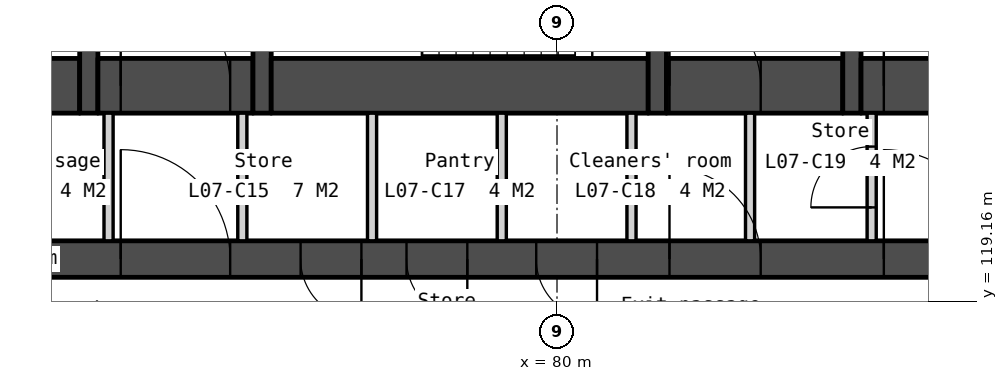
"""IFC4 building model, lengths in metres.
Left out: names, types, materials, properties, quantities, classifications, styles, units other than length and angle.
Written with IfcOpenShell. Run it as: python <this file> out.ifc"""

import sys

from ifc_helpers import new_model, si_unit, direction, frame, frame_2d, origin, place, context, subcontext, project, spatial, polyline, rectangle, outline, extrude, element, fill, save


model = new_model("IFC4")
c1 = context("Model", 3, precision=1e-05, world=origin(), true_north=direction((0.0, 1.0)))
c2 = subcontext(c1, "Body", "Model", "MODEL_VIEW")
j1 = project(units=[si_unit("LENGTHUNIT", "METRE"), si_unit("PLANEANGLEUNIT", "RADIAN")], contexts=[c1])
p1 = place(None, origin())
s1 = spatial("IfcSite", under=j1, at=p1, CompositionType="ELEMENT")
p2 = place(p1, origin())
s2 = spatial("IfcBuilding", under=s1, at=p2, CompositionType="ELEMENT")
p3 = place(p2, frame((0.0, 0.0, 38.5)))
s3 = spatial("IfcBuildingStorey", under=s2, at=p3, CompositionType="ELEMENT", Elevation=38.5)
p4 = place(p3, frame((66.0, 119.85, 0.0), z_axis=(0.0, 0.0, 1.0), x_axis=(1.0, 0.0, 0.0)))
e1 = element("IfcWall", 1, at=p4, inside=s3, PredefinedType="SOLIDWALL", context=c2, shape_type="SweptSolid", body=[
    extrude(rectangle(XDim=28.0, YDim=0.6, at=frame_2d((14.0, 0.0))), origin(), (0.0, 0.0, 1.0), 3.35),
])
p5 = place(p4, frame((6.825, 0.0, 0.0)))
e2 = element("IfcOpeningElement", 2, at=p5, cuts=e1, PredefinedType="OPENING", context=c2, shape_type="SweptSolid", body=[
    extrude(rectangle(XDim=1.8, YDim=2.1, at=frame_2d((0.9, 1.05))), frame((0.0, 0.31, 0.0), z_axis=(0.0, -1.0, 0.0), x_axis=(1.0, 0.0, 0.0)), (0.0, 0.0, 1.0), 0.62),
])
p6 = place(p4, frame((15.85, 0.0, 0.0)))
e3 = element("IfcOpeningElement", 3, at=p6, cuts=e1, PredefinedType="OPENING", context=c2, shape_type="SweptSolid", body=[
    extrude(rectangle(XDim=1.5, YDim=2.1, at=frame_2d((0.75, 1.05))), frame((0.0, 0.31, 0.0), z_axis=(0.0, -1.0, 0.0), x_axis=(1.0, 0.0, 0.0)), (0.0, 0.0, 1.0), 0.62),
])
p7 = place(p4, frame((19.375, 0.0, 0.0)))
e4 = element("IfcOpeningElement", 4, at=p7, cuts=e1, PredefinedType="OPENING", context=c2, shape_type="SweptSolid", body=[
    extrude(rectangle(XDim=1.8, YDim=2.1, at=frame_2d((0.9, 1.05))), frame((0.0, 0.31, 0.0), z_axis=(0.0, -1.0, 0.0), x_axis=(1.0, 0.0, 0.0)), (0.0, 0.0, 1.0), 0.62),
])
p8 = place(p4, frame((4.425, 0.0, 0.0)))
e5 = element("IfcOpeningElement", 5, at=p8, cuts=e1, PredefinedType="OPENING", context=c2, shape_type="SweptSolid", body=[
    extrude(rectangle(XDim=1.0, YDim=2.1, at=frame_2d((0.5, 1.05))), frame((0.0, 0.31, 0.0), z_axis=(0.0, -1.0, 0.0), x_axis=(1.0, 0.0, 0.0)), (0.0, 0.0, 1.0), 0.62),
])
p9 = place(p4, frame((9.783, 0.0, 0.0)))
e6 = element("IfcOpeningElement", 6, at=p9, cuts=e1, PredefinedType="OPENING", context=c2, shape_type="SweptSolid", body=[
    extrude(rectangle(XDim=1.0, YDim=2.1, at=frame_2d((0.5, 1.05))), frame((0.0, 0.31, 0.0), z_axis=(0.0, -1.0, 0.0), x_axis=(1.0, 0.0, 0.0)), (0.0, 0.0, 1.0), 0.62),
])
p10 = place(p4, frame((11.525, 0.0, 0.0)))
e7 = element("IfcOpeningElement", 7, at=p10, cuts=e1, PredefinedType="OPENING", context=c2, shape_type="SweptSolid", body=[
    extrude(rectangle(XDim=1.0, YDim=2.1, at=frame_2d((0.5, 1.05))), frame((0.0, 0.31, 0.0), z_axis=(0.0, -1.0, 0.0), x_axis=(1.0, 0.0, 0.0)), (0.0, 0.0, 1.0), 0.62),
])
p11 = place(p4, frame((13.658, 0.0, 0.0)))
e8 = element("IfcOpeningElement", 8, at=p11, cuts=e1, PredefinedType="OPENING", context=c2, shape_type="SweptSolid", body=[
    extrude(rectangle(XDim=1.0, YDim=2.1, at=frame_2d((0.5, 1.05))), frame((0.0, 0.31, 0.0), z_axis=(0.0, -1.0, 0.0), x_axis=(1.0, 0.0, 0.0)), (0.0, 0.0, 1.0), 0.62),
])
p12 = place(p4, frame((22.575, 0.0, 0.0)))
e9 = element("IfcOpeningElement", 9, at=p12, cuts=e1, PredefinedType="OPENING", context=c2, shape_type="SweptSolid", body=[
    extrude(rectangle(XDim=1.0, YDim=2.1, at=frame_2d((0.5, 1.05))), frame((0.0, 0.31, 0.0), z_axis=(0.0, -1.0, 0.0), x_axis=(1.0, 0.0, 0.0)), (0.0, 0.0, 1.0), 0.62),
])
p13 = place(p3, frame((69.6, 122.7, 0.0), z_axis=(0.0, 0.0, 1.0), x_axis=(1.0, 0.0, 0.0)))
e10 = element("IfcWall", 10, at=p13, inside=s3, PredefinedType="SOLIDWALL", context=c2, shape_type="SweptSolid", body=[
    extrude(rectangle(XDim=2.55, YDim=0.9, at=frame_2d((1.275, 0.0))), origin(), (0.0, 0.0, 1.0), 3.35),
])
p14 = place(p3, frame((72.3, 133.95, 0.0), z_axis=(0.0, 0.0, 1.0), x_axis=(0.0, -1.0, 0.0)))
e11 = element("IfcWall", 11, at=p14, inside=s3, PredefinedType="SOLIDWALL", context=c2, shape_type="SweptSolid", body=[
    extrude(rectangle(XDim=11.7, YDim=0.3, at=frame_2d((5.85, 0.0))), origin(), (0.0, 0.0, 1.0), 3.35),
])
p15 = place(p14, frame((6.95, 0.0, 0.0)))
e12 = element("IfcOpeningElement", 12, at=p15, cuts=e11, PredefinedType="OPENING", context=c2, shape_type="SweptSolid", body=[
    extrude(rectangle(XDim=1.1, YDim=2.1, at=frame_2d((0.55, 1.05))), frame((0.0, 0.16, 0.0), z_axis=(0.0, -1.0, 0.0), x_axis=(1.0, 0.0, 0.0)), (0.0, 0.0, 1.0), 0.32),
])
p16 = place(p14, frame((9.35, 0.0, 0.0)))
e13 = element("IfcOpeningElement", 13, at=p16, cuts=e11, PredefinedType="OPENING", context=c2, shape_type="SweptSolid", body=[
    extrude(rectangle(XDim=0.9, YDim=2.1, at=frame_2d((0.45, 1.05))), frame((0.0, 0.16, 0.0), z_axis=(0.0, -1.0, 0.0), x_axis=(1.0, 0.0, 0.0)), (0.0, 0.0, 1.0), 0.32),
])
p17 = place(p14, frame((5.1, 0.0, 0.0)))
e14 = element("IfcOpeningElement", 14, at=p17, cuts=e11, PredefinedType="OPENING", context=c2, shape_type="SweptSolid", body=[
    extrude(rectangle(XDim=1.0, YDim=2.1, at=frame_2d((0.5, 1.05))), frame((0.0, 0.16, 0.0), z_axis=(0.0, -1.0, 0.0), x_axis=(1.0, 0.0, 0.0)), (0.0, 0.0, 1.0), 0.32),
])
p18 = place(p3, frame((72.45, 122.7, 0.0), z_axis=(0.0, 0.0, 1.0), x_axis=(1.0, 0.0, 0.0)))
e15 = element("IfcWall", 15, at=p18, inside=s3, PredefinedType="SOLIDWALL", context=c2, shape_type="SweptSolid", body=[
    extrude(rectangle(XDim=2.55, YDim=0.9, at=frame_2d((1.275, 0.0))), origin(), (0.0, 0.0, 1.0), 3.35),
])
p19 = place(p18, frame((0.375, 0.0, 0.0)))
e16 = element("IfcOpeningElement", 16, at=p19, cuts=e15, PredefinedType="OPENING", context=c2, shape_type="SweptSolid", body=[
    extrude(rectangle(XDim=1.8, YDim=2.1, at=frame_2d((0.9, 1.05))), frame((0.0, 0.46, 0.0), z_axis=(0.0, -1.0, 0.0), x_axis=(1.0, 0.0, 0.0)), (0.0, 0.0, 1.0), 0.92),
])
for number, where, z_axis, x_axis in (
    (17, (72.625, 122.25, 0.0), (0.0, 0.0, 1.0), (0.0, -1.0, 0.0)),
    (18, (74.825, 122.25, 0.0), (0.0, 0.0, 1.0), (0.0, -1.0, 0.0)),
):
    element("IfcWall", number, at=place(p3, frame(where, z_axis=z_axis, x_axis=x_axis)), inside=s3, PredefinedType="PARTITIONING", context=c2, shape_type="SweptSolid", body=[
        extrude(rectangle(XDim=2.1, YDim=0.15, at=frame_2d((1.05, 0.0))), origin(), (0.0, 0.0, 1.0), 3.35),
    ])
p20 = place(p3, frame((75.15, 133.95, 0.0), z_axis=(0.0, 0.0, 1.0), x_axis=(0.0, -1.0, 0.0)))
e19 = element("IfcWall", 19, at=p20, inside=s3, PredefinedType="SOLIDWALL", context=c2, shape_type="SweptSolid", body=[
    extrude(rectangle(XDim=11.7, YDim=0.3, at=frame_2d((5.85, 0.0))), origin(), (0.0, 0.0, 1.0), 3.35),
])
p21 = place(p3, frame((75.3, 122.7, 0.0), z_axis=(0.0, 0.0, 1.0), x_axis=(1.0, 0.0, 0.0)))
e20 = element("IfcWall", 20, at=p21, inside=s3, PredefinedType="SOLIDWALL", context=c2, shape_type="SweptSolid", body=[
    extrude(rectangle(XDim=6.2, YDim=0.9, at=frame_2d((3.1, 0.0))), origin(), (0.0, 0.0, 1.0), 3.35),
])
for number, where, z_axis, x_axis in (
    (21, (76.958, 122.25, 0.0), (0.0, 0.0, 1.0), (0.0, -1.0, 0.0)),
    (22, (79.092, 122.25, 0.0), (0.0, 0.0, 1.0), (0.0, -1.0, 0.0)),
    (23, (81.225, 122.25, 0.0), (0.0, 0.0, 1.0), (0.0, -1.0, 0.0)),
):
    element("IfcWall", number, at=place(p3, frame(where, z_axis=z_axis, x_axis=x_axis)), inside=s3, PredefinedType="PARTITIONING", context=c2, shape_type="SweptSolid", body=[
        extrude(rectangle(XDim=2.1, YDim=0.15, at=frame_2d((1.05, 0.0))), origin(), (0.0, 0.0, 1.0), 3.35),
    ])
p22 = place(p3, frame((81.65, 125.7, 0.0), z_axis=(0.0, 0.0, 1.0), x_axis=(0.0, -1.0, 0.0)))
e24 = element("IfcWall", 24, at=p22, inside=s3, PredefinedType="SOLIDWALL", context=c2, shape_type="SweptSolid", body=[
    extrude(rectangle(XDim=3.45, YDim=0.3, at=frame_2d((1.725, 0.0))), origin(), (0.0, 0.0, 1.0), 3.35),
])
p23 = place(p22, frame((0.75, 0.0, 0.0)))
e25 = element("IfcOpeningElement", 25, at=p23, cuts=e24, PredefinedType="OPENING", context=c2, shape_type="SweptSolid", body=[
    extrude(rectangle(XDim=1.0, YDim=2.1, at=frame_2d((0.5, 1.05))), frame((0.0, 0.16, 0.0), z_axis=(0.0, -1.0, 0.0), x_axis=(1.0, 0.0, 0.0)), (0.0, 0.0, 1.0), 0.32),
])
p24 = place(p3, frame((81.8, 122.7, 0.0), z_axis=(0.0, 0.0, 1.0), x_axis=(1.0, 0.0, 0.0)))
e26 = element("IfcWall", 26, at=p24, inside=s3, PredefinedType="SOLIDWALL", context=c2, shape_type="SweptSolid", body=[
    extrude(rectangle(XDim=2.9, YDim=0.9, at=frame_2d((1.45, 0.0))), origin(), (0.0, 0.0, 1.0), 3.35),
])
p25 = place(p24, frame((0.05, 0.0, 0.0)))
e27 = element("IfcOpeningElement", 27, at=p25, cuts=e26, PredefinedType="OPENING", context=c2, shape_type="SweptSolid", body=[
    extrude(rectangle(XDim=1.5, YDim=2.1, at=frame_2d((0.75, 1.05))), frame((0.0, 0.46, 0.0), z_axis=(0.0, -1.0, 0.0), x_axis=(1.0, 0.0, 0.0)), (0.0, 0.0, 1.0), 0.92),
])
p26 = place(p3, frame((83.175, 122.25, 0.0), z_axis=(0.0, 0.0, 1.0), x_axis=(0.0, -1.0, 0.0)))
e28 = element("IfcWall", 28, at=p26, inside=s3, PredefinedType="PARTITIONING", context=c2, shape_type="SweptSolid", body=[
    extrude(rectangle(XDim=2.1, YDim=0.15, at=frame_2d((1.05, 0.0))), origin(), (0.0, 0.0, 1.0), 3.35),
])
p27 = place(p3, frame((84.85, 133.95, 0.0), z_axis=(0.0, 0.0, 1.0), x_axis=(0.0, -1.0, 0.0)))
e29 = element("IfcWall", 29, at=p27, inside=s3, PredefinedType="SOLIDWALL", context=c2, shape_type="SweptSolid", body=[
    extrude(rectangle(XDim=11.7, YDim=0.3, at=frame_2d((5.85, 0.0))), origin(), (0.0, 0.0, 1.0), 3.35),
])
p28 = place(p3, frame((85.0, 122.7, 0.0), z_axis=(0.0, 0.0, 1.0), x_axis=(1.0, 0.0, 0.0)))
e30 = element("IfcWall", 30, at=p28, inside=s3, PredefinedType="SOLIDWALL", context=c2, shape_type="SweptSolid", body=[
    extrude(rectangle(XDim=2.55, YDim=0.9, at=frame_2d((1.275, 0.0))), origin(), (0.0, 0.0, 1.0), 3.35),
])
p29 = place(p28, frame((0.375, 0.0, 0.0)))
e31 = element("IfcOpeningElement", 31, at=p29, cuts=e30, PredefinedType="OPENING", context=c2, shape_type="SweptSolid", body=[
    extrude(rectangle(XDim=1.8, YDim=2.1, at=frame_2d((0.9, 1.05))), frame((0.0, 0.46, 0.0), z_axis=(0.0, -1.0, 0.0), x_axis=(1.0, 0.0, 0.0)), (0.0, 0.0, 1.0), 0.92),
])
p30 = place(p3, frame((85.175, 122.25, 0.0), z_axis=(0.0, 0.0, 1.0), x_axis=(0.0, -1.0, 0.0)))
e32 = element("IfcWall", 32, at=p30, inside=s3, PredefinedType="PARTITIONING", context=c2, shape_type="SweptSolid", body=[
    extrude(rectangle(XDim=2.1, YDim=0.15, at=frame_2d((1.05, 0.0))), origin(), (0.0, 0.0, 1.0), 3.35),
])
p31 = place(p30, frame((0.55, 0.0, 0.0)))
e33 = element("IfcOpeningElement", 33, at=p31, cuts=e32, PredefinedType="OPENING", context=c2, shape_type="SweptSolid", body=[
    extrude(rectangle(XDim=1.0, YDim=2.1, at=frame_2d((0.5, 1.05))), frame((0.0, 0.085, 0.0), z_axis=(0.0, -1.0, 0.0), x_axis=(1.0, 0.0, 0.0)), (0.0, 0.0, 1.0), 0.17),
])
p32 = place(p3, frame((54.495, 129.397, -0.15), z_axis=(0.0, 0.0, 1.0), x_axis=(0.499999201451, -0.866025864826, 0.0)))
e34 = element("IfcWall", 34, at=p32, inside=s3, PredefinedType="SOLIDWALL", context=c2, shape_type="SweptSolid", body=[
    extrude(outline(polyline([(44.8, 0.0), (44.8, 3.5), (0.0, 3.5), (0.0, 0.0), (44.8, 0.0)])), frame((0.0, 0.225, 0.0), z_axis=(0.0, -1.0, 0.0), x_axis=(1.0, 0.0, 0.0)), (0.0, 0.0, 1.0), 0.45),
])
p33 = place(p32, frame((0.722, 0.0, 1.05)))
e35 = element("IfcOpeningElement", 35, at=p33, cuts=e34, PredefinedType="OPENING", context=c2, shape_type="SweptSolid", body=[
    extrude(rectangle(XDim=1.2, YDim=1.5, at=frame_2d((0.6, 0.75))), frame((0.0, 0.235, 0.0), z_axis=(0.0, -1.0, 0.0), x_axis=(1.0, 0.0, 0.0)), (0.0, 0.0, 1.0), 0.47),
])
p34 = place(p32, frame((7.51, 0.0, 1.05)))
e36 = element("IfcOpeningElement", 36, at=p34, cuts=e34, PredefinedType="OPENING", context=c2, shape_type="SweptSolid", body=[
    extrude(rectangle(XDim=1.2, YDim=1.5, at=frame_2d((0.6, 0.75))), frame((0.0, 0.235, 0.0), z_axis=(0.0, -1.0, 0.0), x_axis=(1.0, 0.0, 0.0)), (0.0, 0.0, 1.0), 0.47),
])
p35 = place(p32, frame((9.21, 0.0, 1.05)))
e37 = element("IfcOpeningElement", 37, at=p35, cuts=e34, PredefinedType="OPENING", context=c2, shape_type="SweptSolid", body=[
    extrude(rectangle(XDim=1.2, YDim=1.5, at=frame_2d((0.6, 0.75))), frame((0.0, 0.235, 0.0), z_axis=(0.0, -1.0, 0.0), x_axis=(1.0, 0.0, 0.0)), (0.0, 0.0, 1.0), 0.47),
])
p36 = place(p32, frame((16.47, 0.0, 1.05)))
e38 = element("IfcOpeningElement", 38, at=p36, cuts=e34, PredefinedType="OPENING", context=c2, shape_type="SweptSolid", body=[
    extrude(rectangle(XDim=1.2, YDim=1.5, at=frame_2d((0.6, 0.75))), frame((0.0, 0.235, 0.0), z_axis=(0.0, -1.0, 0.0), x_axis=(1.0, 0.0, 0.0)), (0.0, 0.0, 1.0), 0.47),
])
p37 = place(p32, frame((18.17, 0.0, 1.05)))
e39 = element("IfcOpeningElement", 39, at=p37, cuts=e34, PredefinedType="OPENING", context=c2, shape_type="SweptSolid", body=[
    extrude(rectangle(XDim=1.2, YDim=1.5, at=frame_2d((0.6, 0.75))), frame((0.0, 0.235, 0.0), z_axis=(0.0, -1.0, 0.0), x_axis=(1.0, 0.0, 0.0)), (0.0, 0.0, 1.0), 0.47),
])
p38 = place(p32, frame((25.43, 0.0, 1.05)))
e40 = element("IfcOpeningElement", 40, at=p38, cuts=e34, PredefinedType="OPENING", context=c2, shape_type="SweptSolid", body=[
    extrude(rectangle(XDim=1.2, YDim=1.5, at=frame_2d((0.6, 0.75))), frame((0.0, 0.235, 0.0), z_axis=(0.0, -1.0, 0.0), x_axis=(1.0, 0.0, 0.0)), (0.0, 0.0, 1.0), 0.47),
])
p39 = place(p32, frame((27.13, 0.0, 1.05)))
e41 = element("IfcOpeningElement", 41, at=p39, cuts=e34, PredefinedType="OPENING", context=c2, shape_type="SweptSolid", body=[
    extrude(rectangle(XDim=1.2, YDim=1.5, at=frame_2d((0.6, 0.75))), frame((0.0, 0.235, 0.0), z_axis=(0.0, -1.0, 0.0), x_axis=(1.0, 0.0, 0.0)), (0.0, 0.0, 1.0), 0.47),
])
p40 = place(p32, frame((34.39, 0.0, 1.05)))
e42 = element("IfcOpeningElement", 42, at=p40, cuts=e34, PredefinedType="OPENING", context=c2, shape_type="SweptSolid", body=[
    extrude(rectangle(XDim=1.2, YDim=1.5, at=frame_2d((0.6, 0.75))), frame((0.0, 0.235, 0.0), z_axis=(0.0, -1.0, 0.0), x_axis=(1.0, 0.0, 0.0)), (0.0, 0.0, 1.0), 0.47),
])
p41 = place(p32, frame((36.09, 0.0, 1.05)))
e43 = element("IfcOpeningElement", 43, at=p41, cuts=e34, PredefinedType="OPENING", context=c2, shape_type="SweptSolid", body=[
    extrude(rectangle(XDim=1.2, YDim=1.5, at=frame_2d((0.6, 0.75))), frame((0.0, 0.235, 0.0), z_axis=(0.0, -1.0, 0.0), x_axis=(1.0, 0.0, 0.0)), (0.0, 0.0, 1.0), 0.47),
])
p42 = place(p32, frame((42.878, 0.0, 1.05)))
e44 = element("IfcOpeningElement", 44, at=p42, cuts=e34, PredefinedType="OPENING", context=c2, shape_type="SweptSolid", body=[
    extrude(rectangle(XDim=1.2, YDim=1.5, at=frame_2d((0.6, 0.75))), frame((0.0, 0.235, 0.0), z_axis=(0.0, -1.0, 0.0), x_axis=(1.0, 0.0, 0.0)), (0.0, 0.0, 1.0), 0.47),
])
p43 = place(p3, frame((83.105, 90.599, -0.15), z_axis=(0.0, 0.0, 1.0), x_axis=(0.499999201451, 0.866025864826, 0.0)))
e45 = element("IfcWall", 45, at=p43, inside=s3, PredefinedType="SOLIDWALL", context=c2, shape_type="SweptSolid", body=[
    extrude(outline(polyline([(44.8, 0.0), (44.8, 3.5), (0.0, 3.5), (0.0, 0.0), (44.8, 0.0)])), frame((0.0, 0.225, 0.0), z_axis=(0.0, -1.0, 0.0), x_axis=(1.0, 0.0, 0.0)), (0.0, 0.0, 1.0), 0.45),
])
p44 = place(p43, frame((0.722, 0.0, 1.05)))
e46 = element("IfcOpeningElement", 46, at=p44, cuts=e45, PredefinedType="OPENING", context=c2, shape_type="SweptSolid", body=[
    extrude(rectangle(XDim=1.2, YDim=1.5, at=frame_2d((0.6, 0.75))), frame((0.0, 0.235, 0.0), z_axis=(0.0, -1.0, 0.0), x_axis=(1.0, 0.0, 0.0)), (0.0, 0.0, 1.0), 0.47),
])
p45 = place(p43, frame((7.51, 0.0, 1.05)))
e47 = element("IfcOpeningElement", 47, at=p45, cuts=e45, PredefinedType="OPENING", context=c2, shape_type="SweptSolid", body=[
    extrude(rectangle(XDim=1.2, YDim=1.5, at=frame_2d((0.6, 0.75))), frame((0.0, 0.235, 0.0), z_axis=(0.0, -1.0, 0.0), x_axis=(1.0, 0.0, 0.0)), (0.0, 0.0, 1.0), 0.47),
])
p46 = place(p43, frame((9.21, 0.0, 1.05)))
e48 = element("IfcOpeningElement", 48, at=p46, cuts=e45, PredefinedType="OPENING", context=c2, shape_type="SweptSolid", body=[
    extrude(rectangle(XDim=1.2, YDim=1.5, at=frame_2d((0.6, 0.75))), frame((0.0, 0.235, 0.0), z_axis=(0.0, -1.0, 0.0), x_axis=(1.0, 0.0, 0.0)), (0.0, 0.0, 1.0), 0.47),
])
p47 = place(p43, frame((16.47, 0.0, 1.05)))
e49 = element("IfcOpeningElement", 49, at=p47, cuts=e45, PredefinedType="OPENING", context=c2, shape_type="SweptSolid", body=[
    extrude(rectangle(XDim=1.2, YDim=1.5, at=frame_2d((0.6, 0.75))), frame((0.0, 0.235, 0.0), z_axis=(0.0, -1.0, 0.0), x_axis=(1.0, 0.0, 0.0)), (0.0, 0.0, 1.0), 0.47),
])
p48 = place(p43, frame((18.17, 0.0, 1.05)))
e50 = element("IfcOpeningElement", 50, at=p48, cuts=e45, PredefinedType="OPENING", context=c2, shape_type="SweptSolid", body=[
    extrude(rectangle(XDim=1.2, YDim=1.5, at=frame_2d((0.6, 0.75))), frame((0.0, 0.235, 0.0), z_axis=(0.0, -1.0, 0.0), x_axis=(1.0, 0.0, 0.0)), (0.0, 0.0, 1.0), 0.47),
])
p49 = place(p43, frame((25.43, 0.0, 1.05)))
e51 = element("IfcOpeningElement", 51, at=p49, cuts=e45, PredefinedType="OPENING", context=c2, shape_type="SweptSolid", body=[
    extrude(rectangle(XDim=1.2, YDim=1.5, at=frame_2d((0.6, 0.75))), frame((0.0, 0.235, 0.0), z_axis=(0.0, -1.0, 0.0), x_axis=(1.0, 0.0, 0.0)), (0.0, 0.0, 1.0), 0.47),
])
p50 = place(p43, frame((27.13, 0.0, 1.05)))
e52 = element("IfcOpeningElement", 52, at=p50, cuts=e45, PredefinedType="OPENING", context=c2, shape_type="SweptSolid", body=[
    extrude(rectangle(XDim=1.2, YDim=1.5, at=frame_2d((0.6, 0.75))), frame((0.0, 0.235, 0.0), z_axis=(0.0, -1.0, 0.0), x_axis=(1.0, 0.0, 0.0)), (0.0, 0.0, 1.0), 0.47),
])
p51 = place(p43, frame((34.39, 0.0, 1.05)))
e53 = element("IfcOpeningElement", 53, at=p51, cuts=e45, PredefinedType="OPENING", context=c2, shape_type="SweptSolid", body=[
    extrude(rectangle(XDim=1.2, YDim=1.5, at=frame_2d((0.6, 0.75))), frame((0.0, 0.235, 0.0), z_axis=(0.0, -1.0, 0.0), x_axis=(1.0, 0.0, 0.0)), (0.0, 0.0, 1.0), 0.47),
])
p52 = place(p43, frame((36.09, 0.0, 1.05)))
e54 = element("IfcOpeningElement", 54, at=p52, cuts=e45, PredefinedType="OPENING", context=c2, shape_type="SweptSolid", body=[
    extrude(rectangle(XDim=1.2, YDim=1.5, at=frame_2d((0.6, 0.75))), frame((0.0, 0.235, 0.0), z_axis=(0.0, -1.0, 0.0), x_axis=(1.0, 0.0, 0.0)), (0.0, 0.0, 1.0), 0.47),
])
p53 = place(p43, frame((42.878, 0.0, 1.05)))
e55 = element("IfcOpeningElement", 55, at=p53, cuts=e45, PredefinedType="OPENING", context=c2, shape_type="SweptSolid", body=[
    extrude(rectangle(XDim=1.2, YDim=1.5, at=frame_2d((0.6, 0.75))), frame((0.0, 0.235, 0.0), z_axis=(0.0, -1.0, 0.0), x_axis=(1.0, 0.0, 0.0)), (0.0, 0.0, 1.0), 0.47),
])
p54 = place(p29, origin())
e56 = element("IfcDoor", 56, at=p54, inside=s3, OperationType="DOUBLE_DOOR_DOUBLE_SWING", PredefinedType="DOOR", context=c2, shape_type="SweptSolid", body=[
    extrude(rectangle(XDim=1.8, YDim=2.1, at=frame_2d((0.9, 1.05))), frame((0.0, 0.025, 0.0), z_axis=(0.0, -1.0, 0.0), x_axis=(1.0, 0.0, 0.0)), (0.0, 0.0, 1.0), 0.05),
])
fill(e31, e56)
p55 = place(p19, origin())
e57 = element("IfcDoor", 57, at=p55, inside=s3, OperationType="DOUBLE_DOOR_DOUBLE_SWING", PredefinedType="DOOR", context=c2, shape_type="SweptSolid", body=[
    extrude(rectangle(XDim=1.8, YDim=2.1, at=frame_2d((0.9, 1.05))), frame((0.0, 0.025, 0.0), z_axis=(0.0, -1.0, 0.0), x_axis=(1.0, 0.0, 0.0)), (0.0, 0.0, 1.0), 0.05),
])
fill(e16, e57)
p56 = place(p25, origin())
e58 = element("IfcDoor", 58, at=p56, inside=s3, OperationType="DOUBLE_DOOR_DOUBLE_SWING", PredefinedType="DOOR", context=c2, shape_type="SweptSolid", body=[
    extrude(rectangle(XDim=1.5, YDim=2.1, at=frame_2d((0.75, 1.05))), frame((0.0, 0.025, 0.0), z_axis=(0.0, -1.0, 0.0), x_axis=(1.0, 0.0, 0.0)), (0.0, 0.0, 1.0), 0.05),
])
fill(e27, e58)
p57 = place(p5, origin())
e59 = element("IfcDoor", 59, at=p57, inside=s3, OperationType="DOUBLE_DOOR_DOUBLE_SWING", PredefinedType="DOOR", context=c2, shape_type="SweptSolid", body=[
    extrude(rectangle(XDim=1.8, YDim=2.1, at=frame_2d((0.9, 1.05))), frame((0.0, 0.025, 0.0), z_axis=(0.0, -1.0, 0.0), x_axis=(1.0, 0.0, 0.0)), (0.0, 0.0, 1.0), 0.05),
])
fill(e2, e59)
p58 = place(p6, origin())
e60 = element("IfcDoor", 60, at=p58, inside=s3, OperationType="DOUBLE_DOOR_DOUBLE_SWING", PredefinedType="DOOR", context=c2, shape_type="SweptSolid", body=[
    extrude(rectangle(XDim=1.5, YDim=2.1, at=frame_2d((0.75, 1.05))), frame((0.0, 0.025, 0.0), z_axis=(0.0, -1.0, 0.0), x_axis=(1.0, 0.0, 0.0)), (0.0, 0.0, 1.0), 0.05),
])
fill(e3, e60)
p59 = place(p7, origin())
e61 = element("IfcDoor", 61, at=p59, inside=s3, OperationType="DOUBLE_DOOR_DOUBLE_SWING", PredefinedType="DOOR", context=c2, shape_type="SweptSolid", body=[
    extrude(rectangle(XDim=1.8, YDim=2.1, at=frame_2d((0.9, 1.05))), frame((0.0, 0.025, 0.0), z_axis=(0.0, -1.0, 0.0), x_axis=(1.0, 0.0, 0.0)), (0.0, 0.0, 1.0), 0.05),
])
fill(e4, e61)
p60 = place(p9, origin())
e62 = element("IfcDoor", 62, at=p60, inside=s3, OperationType="SINGLE_SWING_RIGHT", PredefinedType="DOOR", context=c2, shape_type="SweptSolid", body=[
    extrude(rectangle(XDim=1.0, YDim=2.1, at=frame_2d((0.5, 1.05))), frame((0.0, 0.025, 0.0), z_axis=(0.0, -1.0, 0.0), x_axis=(1.0, 0.0, 0.0)), (0.0, 0.0, 1.0), 0.05),
])
fill(e6, e62)
p61 = place(p10, origin())
e63 = element("IfcDoor", 63, at=p61, inside=s3, OperationType="SINGLE_SWING_RIGHT", PredefinedType="DOOR", context=c2, shape_type="SweptSolid", body=[
    extrude(rectangle(XDim=1.0, YDim=2.1, at=frame_2d((0.5, 1.05))), frame((0.0, 0.025, 0.0), z_axis=(0.0, -1.0, 0.0), x_axis=(1.0, 0.0, 0.0)), (0.0, 0.0, 1.0), 0.05),
])
fill(e7, e63)
p62 = place(p11, origin())
e64 = element("IfcDoor", 64, at=p62, inside=s3, OperationType="SINGLE_SWING_RIGHT", PredefinedType="DOOR", context=c2, shape_type="SweptSolid", body=[
    extrude(rectangle(XDim=1.0, YDim=2.1, at=frame_2d((0.5, 1.05))), frame((0.0, 0.025, 0.0), z_axis=(0.0, -1.0, 0.0), x_axis=(1.0, 0.0, 0.0)), (0.0, 0.0, 1.0), 0.05),
])
fill(e8, e64)
p63 = place(p31, origin())
e65 = element("IfcDoor", 65, at=p63, inside=s3, OperationType="SINGLE_SWING_RIGHT", PredefinedType="DOOR", context=c2, shape_type="SweptSolid", body=[
    extrude(rectangle(XDim=1.0, YDim=2.1, at=frame_2d((0.5, 1.05))), frame((0.0, 0.025, 0.0), z_axis=(0.0, -1.0, 0.0), x_axis=(1.0, 0.0, 0.0)), (0.0, 0.0, 1.0), 0.05),
])
fill(e33, e65)
save(model, sys.argv[1])
